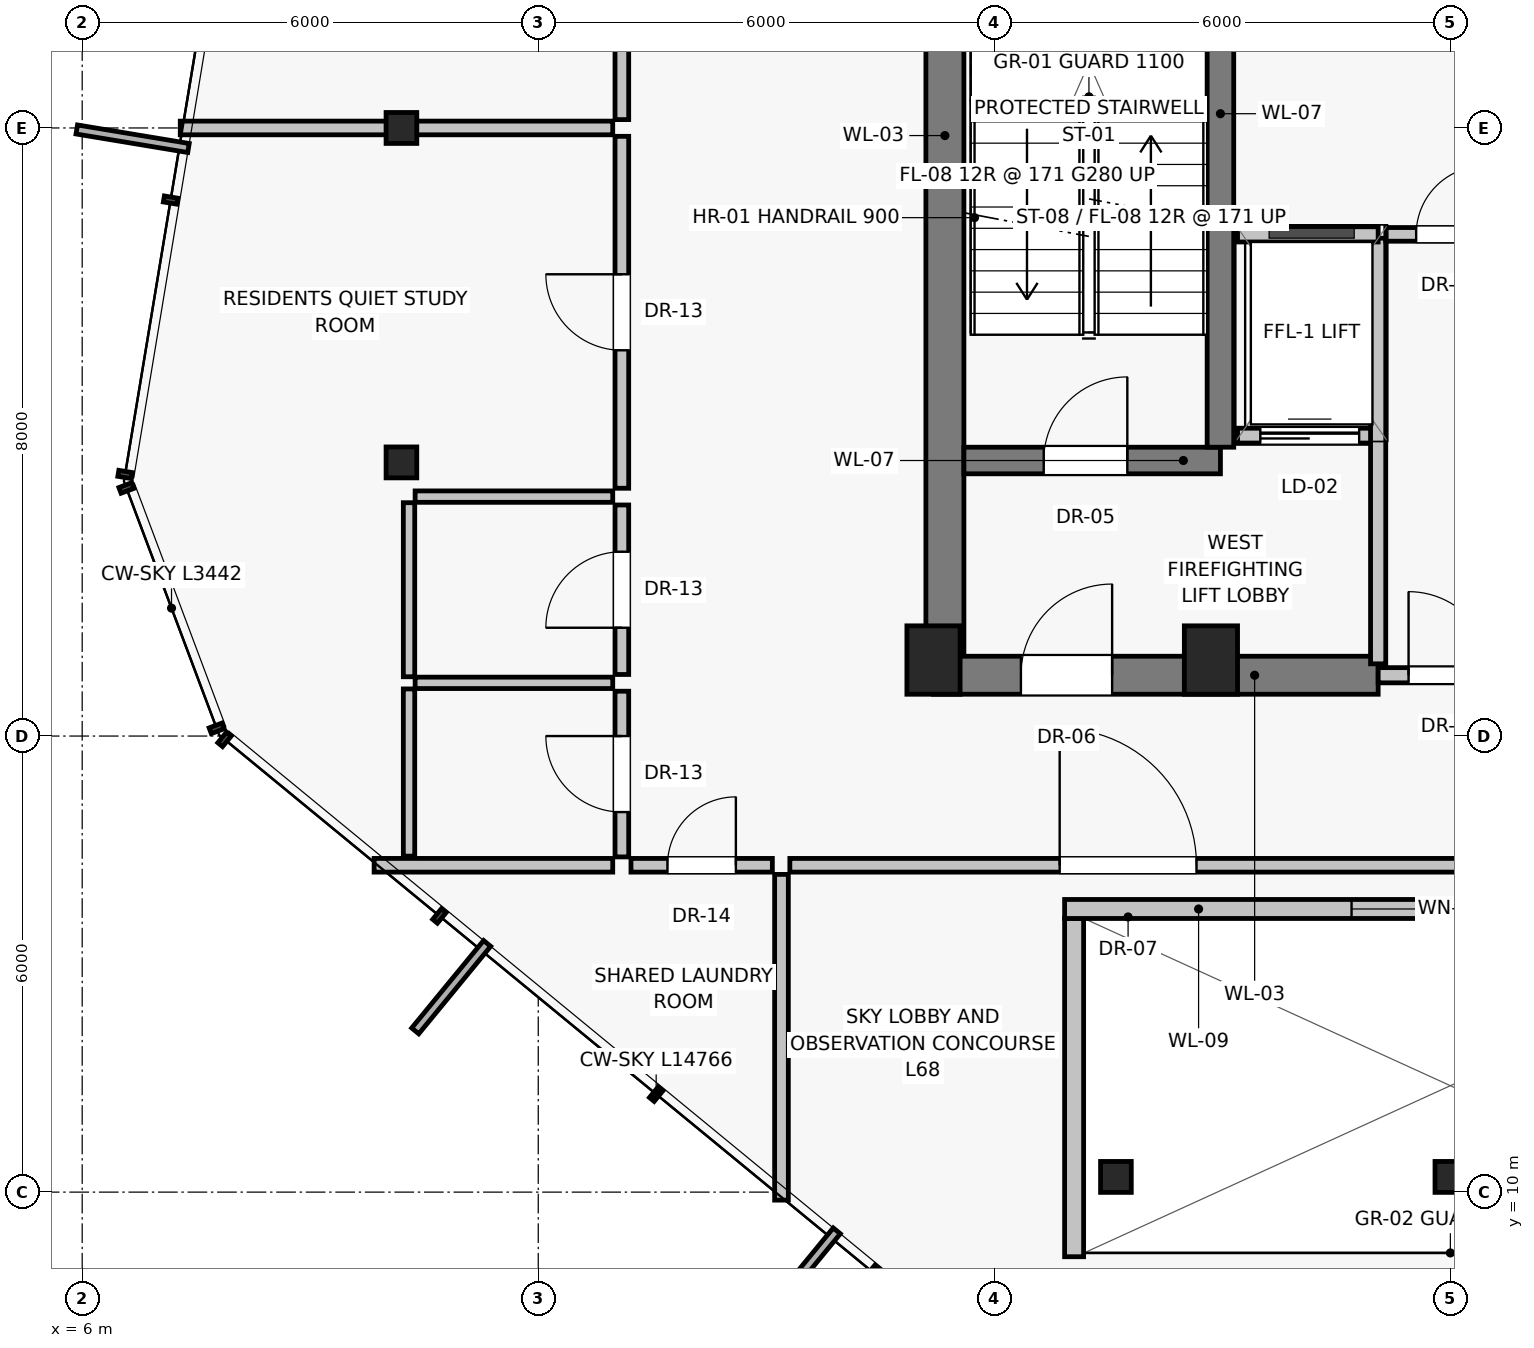
"""IFC4 building model, lengths in metres.
Left out: names, types, materials, properties, quantities, classifications, styles, units other than length and angle.
Written with IfcOpenShell. Run it as: python <this file> out.ifc"""

import sys

from ifc_helpers import new_model, si_unit, direction, frame, frame_2d, origin, origin_2d, place, context, subcontext, project, spatial, rectangle, i_section, extrude, source, transform, mapped, element, fill, save


model = new_model("IFC4")
c1 = context("Model", 3, precision=1e-05, world=origin(), true_north=direction((0.0, 1.0)))
c2 = subcontext(c1, "Body", "Model", "MODEL_VIEW")
j1 = project(units=[si_unit("LENGTHUNIT", "METRE"), si_unit("PLANEANGLEUNIT", "RADIAN")], contexts=[c1])
p1 = place(None, origin())
s1 = spatial("IfcSite", under=j1, at=p1, CompositionType="ELEMENT")
p2 = place(p1, origin())
s2 = spatial("IfcBuilding", under=s1, at=p2, CompositionType="ELEMENT")
p3 = place(p2, frame((0.0, 0.0, 240.65)))
s3 = spatial("IfcBuildingStorey", under=s2, at=p3, CompositionType="ELEMENT", Elevation=240.65)
for number, where, z_axis, x_axis in (
    (1, (17.2, 17.0, 0.0), (0.0, 0.0, 1.0), (1.0, 0.0, 0.0)),
    (2, (20.85, 17.0, 0.0), (0.0, 0.0, 1.0), (1.0, 0.0, 0.0)),
):
    element("IfcColumn", number, at=place(p3, frame(where, z_axis=z_axis, x_axis=x_axis)), inside=s3, PredefinedType="PILASTER", context=c2, shape_type="SweptSolid", body=[
        extrude(rectangle(XDim=0.7, YDim=0.9, at=origin_2d()), origin(), (0.0, 0.0, 1.0), 4.1),
    ])
for number, where, z_axis, x_axis in (
    (3, (10.2, 24.0, 0.0), (0.0, 0.0, 1.0), (1.0, 0.0, 0.0)),
    (4, (10.2, 19.6, 0.0), (0.0, 0.0, 1.0), (1.0, 0.0, 0.0)),
    (5, (19.6, 10.2, 0.0), (0.0, 0.0, 1.0), (1.0, 0.0, 0.0)),
    (6, (24.0, 10.2, 0.0), (0.0, 0.0, 1.0), (1.0, 0.0, 0.0)),
):
    element("IfcColumn", number, at=place(p3, frame(where, z_axis=z_axis, x_axis=x_axis)), inside=s3, PredefinedType="COLUMN", context=c2, shape_type="SweptSolid", body=[
        extrude(i_section(OverallWidth=0.404, OverallDepth=0.407, WebThickness=0.025, FlangeThickness=0.04, at=origin_2d()), origin(), (0.0, 0.0, 1.0), 4.1),
    ])
p4 = place(p3, frame((19.05, 9.15, 0.0), z_axis=(0.0, 0.0, 1.0), x_axis=(0.0, 1.0, 0.0)))
e7 = element("IfcWall", 7, at=p4, inside=s3, PredefinedType="SOLIDWALL", context=c2, shape_type="SweptSolid", body=[
    extrude(rectangle(XDim=4.45, YDim=0.25, at=frame_2d((2.225, 0.0))), origin(), (0.0, 0.0, 1.0), 3.393),
])
p5 = place(p3, frame((18.925, 13.725, 0.0), z_axis=(0.0, 0.0, 1.0), x_axis=(1.0, 0.0, 0.0)))
e8 = element("IfcWall", 8, at=p5, inside=s3, PredefinedType="SOLIDWALL", context=c2, shape_type="SweptSolid", body=[
    extrude(rectangle(XDim=10.15, YDim=0.25, at=frame_2d((5.075, 0.0))), origin(), (0.0, 0.0, 1.0), 3.512),
])
p6 = place(p5, frame((3.775, 0.0, 0.7)))
e9 = element("IfcOpeningElement", 9, at=p6, cuts=e8, PredefinedType="OPENING", context=c2, shape_type="SweptSolid", body=[
    extrude(rectangle(XDim=2.6, YDim=2.1, at=frame_2d((1.3, 1.05))), frame((0.0, 0.135, 0.0), z_axis=(0.0, -1.0, 0.0), x_axis=(1.0, 0.0, 0.0)), (0.0, 0.0, 1.0), 0.27),
])
p7 = place(p3, frame((17.35, 16.8, 0.0), z_axis=(0.0, 0.0, 1.0), x_axis=(0.0, 1.0, 0.0)))
e10 = element("IfcWall", 10, at=p7, inside=s3, PredefinedType="SHEAR", context=c2, shape_type="SweptSolid", body=[
    extrude(rectangle(XDim=14.2, YDim=0.5, at=frame_2d((7.1, 0.0))), origin(), (0.0, 0.0, 1.0), 3.865),
])
p8 = place(p3, frame((17.2, 16.8, 0.0), z_axis=(0.0, 0.0, 1.0), x_axis=(1.0, 0.0, 0.0)))
e11 = element("IfcWall", 11, at=p8, inside=s3, PredefinedType="SHEAR", context=c2, shape_type="SweptSolid", body=[
    extrude(rectangle(XDim=5.85, YDim=0.5, at=frame_2d((2.925, 0.0))), origin(), (0.0, 0.0, 1.0), 3.865),
])
p9 = place(p8, frame((1.15, 0.0, 0.0)))
e12 = element("IfcOpeningElement", 12, at=p9, cuts=e11, PredefinedType="OPENING", context=c2, shape_type="SweptSolid", body=[
    extrude(rectangle(XDim=1.2, YDim=2.03, at=frame_2d((0.6, 1.015))), frame((0.0, 0.26, 0.0), z_axis=(0.0, -1.0, 0.0), x_axis=(1.0, 0.0, 0.0)), (0.0, 0.0, 1.0), 0.52),
])
p10 = place(p3, frame((23.05, 16.8, 0.0), z_axis=(0.0, 0.0, 1.0), x_axis=(1.0, 0.0, 0.0)))
e13 = element("IfcWall", 13, at=p10, inside=s3, PredefinedType="SOLIDWALL", context=c2, shape_type="SweptSolid", body=[
    extrude(rectangle(XDim=1.9, YDim=0.2, at=frame_2d((0.95, 0.0))), origin(), (0.0, 0.0, 1.0), 3.015),
])
p11 = place(p10, frame((0.4, 0.0, 0.0)))
e14 = element("IfcOpeningElement", 14, at=p11, cuts=e13, PredefinedType="OPENING", context=c2, shape_type="SweptSolid", body=[
    extrude(rectangle(XDim=1.1, YDim=2.03, at=frame_2d((0.55, 1.015))), frame((0.0, 0.11, 0.0), z_axis=(0.0, -1.0, 0.0), x_axis=(1.0, 0.0, 0.0)), (0.0, 0.0, 1.0), 0.22),
])
p12 = place(p3, frame((17.6, 19.625, 0.0), z_axis=(0.0, 0.0, 1.0), x_axis=(1.0, 0.0, 0.0)))
e15 = element("IfcWall", 15, at=p12, inside=s3, PredefinedType="SHEAR", context=c2, shape_type="SweptSolid", body=[
    extrude(rectangle(XDim=3.375, YDim=0.35, at=frame_2d((1.688, 0.0))), origin(), (0.0, 0.0, 1.0), 3.865),
])
p13 = place(p12, frame((1.05, 0.0, 0.0)))
e16 = element("IfcOpeningElement", 16, at=p13, cuts=e15, PredefinedType="OPENING", context=c2, shape_type="SweptSolid", body=[
    extrude(rectangle(XDim=1.1, YDim=2.03, at=frame_2d((0.55, 1.015))), frame((0.0, 0.185, 0.0), z_axis=(0.0, -1.0, 0.0), x_axis=(1.0, 0.0, 0.0)), (0.0, 0.0, 1.0), 0.37),
])
p14 = place(p3, frame((21.2, 19.95, 0.0), z_axis=(0.0, 0.0, 1.0), x_axis=(1.0, 0.0, 0.0)))
e17 = element("IfcWall", 17, at=p14, inside=s3, PredefinedType="SOLIDWALL", context=c2, shape_type="SweptSolid", body=[
    extrude(rectangle(XDim=1.85, YDim=0.2, at=frame_2d((0.925, 0.0))), origin(), (0.0, 0.0, 1.0), 3.865),
])
p15 = place(p14, frame((0.3, 0.0, 0.0)))
e18 = element("IfcOpeningElement", 18, at=p15, cuts=e17, PredefinedType="OPENING", context=c2, shape_type="SweptSolid", body=[
    extrude(rectangle(XDim=1.3, YDim=2.25, at=frame_2d((0.65, 1.125))), frame((0.0, 0.11, 0.0), z_axis=(0.0, -1.0, 0.0), x_axis=(1.0, 0.0, 0.0)), (0.0, 0.0, 1.0), 0.22),
])
p16 = place(p3, frame((20.975, 19.8, 0.0), z_axis=(0.0, 0.0, 1.0), x_axis=(0.0, 1.0, 0.0)))
e19 = element("IfcWall", 19, at=p16, inside=s3, PredefinedType="SHEAR", context=c2, shape_type="SweptSolid", body=[
    extrude(rectangle(XDim=8.775, YDim=0.35, at=frame_2d((4.387, 0.0))), origin(), (0.0, 0.0, 1.0), 3.865),
])
p17 = place(p3, frame((23.05, 16.95, 0.0), z_axis=(0.0, 0.0, 1.0), x_axis=(0.0, 1.0, 0.0)))
e20 = element("IfcWall", 20, at=p17, inside=s3, PredefinedType="SOLIDWALL", context=c2, shape_type="SweptSolid", body=[
    extrude(rectangle(XDim=5.6, YDim=0.2, at=frame_2d((2.8, 0.0))), origin(), (0.0, 0.0, 1.0), 3.865),
])
p18 = place(p3, frame((21.2, 22.6, 0.0), z_axis=(0.0, 0.0, 1.0), x_axis=(1.0, 0.0, 0.0)))
e21 = element("IfcWall", 21, at=p18, inside=s3, PredefinedType="SOLIDWALL", context=c2, shape_type="SweptSolid", body=[
    extrude(rectangle(XDim=1.85, YDim=0.2, at=frame_2d((0.925, 0.0))), origin(), (0.0, 0.0, 1.0), 3.865),
])
p19 = place(p3, frame((23.15, 22.6, 0.0), z_axis=(0.0, 0.0, 1.0), x_axis=(1.0, 0.0, 0.0)))
e22 = element("IfcWall", 22, at=p19, inside=s3, PredefinedType="PARTITIONING", context=c2, shape_type="SweptSolid", body=[
    extrude(rectangle(XDim=1.7, YDim=0.18, at=frame_2d((0.85, 0.0))), origin(), (0.0, 0.0, 1.0), 3.865),
])
p20 = place(p19, frame((0.4, 0.0, 0.0)))
e23 = element("IfcOpeningElement", 23, at=p20, cuts=e22, PredefinedType="OPENING", context=c2, shape_type="SweptSolid", body=[
    extrude(rectangle(XDim=0.9, YDim=2.01, at=frame_2d((0.45, 1.005))), frame((0.0, 0.1, 0.0), z_axis=(0.0, -1.0, 0.0), x_axis=(1.0, 0.0, 0.0)), (0.0, 0.0, 1.0), 0.2),
])
p21 = place(p3, frame((15.2, 14.18, 0.0), z_axis=(0.0, 0.0, 1.0), x_axis=(0.0, -1.0, 0.0)))
e24 = element("IfcWall", 24, at=p21, inside=s3, PredefinedType="PARTITIONING", context=c2, shape_type="SweptSolid", body=[
    extrude(rectangle(XDim=4.285, YDim=0.18, at=frame_2d((2.143, 0.0))), origin(), (0.0, 0.0, 1.0), 3.865),
])
p22 = place(p3, frame((15.31, 14.3, 0.0), z_axis=(0.0, 0.0, 1.0), x_axis=(1.0, 0.0, 0.0)))
e25 = element("IfcWall", 25, at=p22, inside=s3, PredefinedType="PARTITIONING", context=c2, shape_type="SweptSolid", body=[
    extrude(rectangle(XDim=8.9, YDim=0.18, at=frame_2d((4.45, 0.0))), origin(), (0.0, 0.0, 1.0), 3.865),
])
p23 = place(p22, frame((3.55, 0.0, 0.0)))
e26 = element("IfcOpeningElement", 26, at=p23, cuts=e25, PredefinedType="OPENING", context=c2, shape_type="SweptSolid", body=[
    extrude(rectangle(XDim=1.8, YDim=2.25, at=frame_2d((0.9, 1.125))), frame((0.0, 0.1, 0.0), z_axis=(0.0, -1.0, 0.0), x_axis=(1.0, 0.0, 0.0)), (0.0, 0.0, 1.0), 0.2),
])
p24 = place(p3, frame((12.98, 14.3, 0.0), z_axis=(0.0, 0.0, 1.0), x_axis=(-1.0, 0.0, 0.0)))
e27 = element("IfcWall", 27, at=p24, inside=s3, PredefinedType="PARTITIONING", context=c2, shape_type="SweptSolid", body=[
    extrude(rectangle(XDim=3.139, YDim=0.18, at=frame_2d((1.57, 0.0))), origin(), (0.0, 0.0, 1.0), 3.865),
])
p25 = place(p3, frame((13.1, 14.41, 0.0), z_axis=(0.0, 0.0, 1.0), x_axis=(0.0, 1.0, 0.0)))
e28 = element("IfcWall", 28, at=p25, inside=s3, PredefinedType="PARTITIONING", context=c2, shape_type="SweptSolid", body=[
    extrude(rectangle(XDim=2.18, YDim=0.18, at=frame_2d((1.09, 0.0))), origin(), (0.0, 0.0, 1.0), 3.865),
])
p26 = place(p25, frame((0.59, 0.0, 0.0)))
e29 = element("IfcOpeningElement", 29, at=p26, cuts=e28, PredefinedType="OPENING", context=c2, shape_type="SweptSolid", body=[
    extrude(rectangle(XDim=1.0, YDim=2.01, at=frame_2d((0.5, 1.005))), frame((0.0, 0.1, 0.0), z_axis=(0.0, -1.0, 0.0), x_axis=(1.0, 0.0, 0.0)), (0.0, 0.0, 1.0), 0.2),
])
p27 = place(p3, frame((13.1, 16.81, 0.0), z_axis=(0.0, 0.0, 1.0), x_axis=(0.0, 1.0, 0.0)))
e30 = element("IfcWall", 30, at=p27, inside=s3, PredefinedType="PARTITIONING", context=c2, shape_type="SweptSolid", body=[
    extrude(rectangle(XDim=2.23, YDim=0.18, at=frame_2d((1.115, 0.0))), origin(), (0.0, 0.0, 1.0), 3.512),
])
p28 = place(p27, frame((0.615, 0.0, 0.0)))
e31 = element("IfcOpeningElement", 31, at=p28, cuts=e30, PredefinedType="OPENING", context=c2, shape_type="SweptSolid", body=[
    extrude(rectangle(XDim=1.0, YDim=2.01, at=frame_2d((0.5, 1.005))), frame((0.0, 0.1, 0.0), z_axis=(0.0, -1.0, 0.0), x_axis=(1.0, 0.0, 0.0)), (0.0, 0.0, 1.0), 0.2),
])
p29 = place(p3, frame((13.1, 19.26, 0.0), z_axis=(0.0, 0.0, 1.0), x_axis=(0.0, 1.0, 0.0)))
e32 = element("IfcWall", 32, at=p29, inside=s3, PredefinedType="PARTITIONING", context=c2, shape_type="SweptSolid", body=[
    extrude(rectangle(XDim=4.63, YDim=0.18, at=frame_2d((2.315, 0.0))), origin(), (0.0, 0.0, 1.0), 3.512),
])
p30 = place(p29, frame((1.815, 0.0, 0.0)))
e33 = element("IfcOpeningElement", 33, at=p30, cuts=e32, PredefinedType="OPENING", context=c2, shape_type="SweptSolid", body=[
    extrude(rectangle(XDim=1.0, YDim=2.01, at=frame_2d((0.5, 1.005))), frame((0.0, 0.1, 0.0), z_axis=(0.0, -1.0, 0.0), x_axis=(1.0, 0.0, 0.0)), (0.0, 0.0, 1.0), 0.2),
])
p31 = place(p3, frame((13.1, 24.11, 0.0), z_axis=(0.0, 0.0, 1.0), x_axis=(0.0, 1.0, 0.0)))
e34 = element("IfcWall", 34, at=p31, inside=s3, PredefinedType="PARTITIONING", context=c2, shape_type="SweptSolid", body=[
    extrude(rectangle(XDim=9.28, YDim=0.18, at=frame_2d((4.64, 0.0))), origin(), (0.0, 0.0, 1.0), 3.512),
])
p32 = place(p31, frame((4.14, 0.0, 0.0)))
e35 = element("IfcOpeningElement", 35, at=p32, cuts=e34, PredefinedType="OPENING", context=c2, shape_type="SweptSolid", body=[
    extrude(rectangle(XDim=1.0, YDim=2.01, at=frame_2d((0.5, 1.005))), frame((0.0, 0.1, 0.0), z_axis=(0.0, -1.0, 0.0), x_axis=(1.0, 0.0, 0.0)), (0.0, 0.0, 1.0), 0.2),
])
for number, where, z_axis, x_axis in (
    (36, (12.98, 16.7, 0.0), (0.0, 0.0, 1.0), (-1.0, 0.0, 0.0)),
    (37, (12.98, 19.15, 0.0), (0.0, 0.0, 1.0), (-1.0, 0.0, 0.0)),
):
    element("IfcWall", number, at=place(p3, frame(where, z_axis=z_axis, x_axis=x_axis)), inside=s3, PredefinedType="PARTITIONING", context=c2, shape_type="SweptSolid", body=[
        extrude(rectangle(XDim=2.6, YDim=0.15, at=frame_2d((1.3, 0.0))), origin(), (0.0, 0.0, 1.0), 3.865),
    ])
p33 = place(p3, frame((10.3, 14.42, 0.0), z_axis=(0.0, 0.0, 1.0), x_axis=(0.0, 1.0, 0.0)))
e38 = element("IfcWall", 38, at=p33, inside=s3, PredefinedType="PARTITIONING", context=c2, shape_type="SweptSolid", body=[
    extrude(rectangle(XDim=2.2, YDim=0.15, at=frame_2d((1.1, 0.0))), origin(), (0.0, 0.0, 1.0), 3.865),
])
p34 = place(p3, frame((10.3, 16.78, 0.0), z_axis=(0.0, 0.0, 1.0), x_axis=(0.0, 1.0, 0.0)))
e39 = element("IfcWall", 39, at=p34, inside=s3, PredefinedType="PARTITIONING", context=c2, shape_type="SweptSolid", body=[
    extrude(rectangle(XDim=2.29, YDim=0.15, at=frame_2d((1.145, 0.0))), origin(), (0.0, 0.0, 1.0), 3.865),
])
p35 = place(p3, frame((12.98, 24.0, 0.0), z_axis=(0.0, 0.0, 1.0), x_axis=(-1.0, 0.0, 0.0)))
e40 = element("IfcWall", 40, at=p35, inside=s3, PredefinedType="PARTITIONING", context=c2, shape_type="SweptSolid", body=[
    extrude(rectangle(XDim=5.69, YDim=0.18, at=frame_2d((2.845, 0.0))), origin(), (0.0, 0.0, 1.0), 3.865),
])
p36 = place(p3, frame((13.22, 14.3, 0.0), z_axis=(0.0, 0.0, 1.0), x_axis=(1.0, 0.0, 0.0)))
e41 = element("IfcWall", 41, at=p36, inside=s3, PredefinedType="PARTITIONING", context=c2, shape_type="SweptSolid", body=[
    extrude(rectangle(XDim=1.86, YDim=0.18, at=frame_2d((0.93, 0.0))), origin(), (0.0, 0.0, 1.0), 3.865),
])
p37 = place(p36, frame((0.48, 0.0, 0.0)))
e42 = element("IfcOpeningElement", 42, at=p37, cuts=e41, PredefinedType="OPENING", context=c2, shape_type="SweptSolid", body=[
    extrude(rectangle(XDim=0.9, YDim=2.01, at=frame_2d((0.45, 1.005))), frame((0.0, 0.1, 0.0), z_axis=(0.0, -1.0, 0.0), x_axis=(1.0, 0.0, 0.0)), (0.0, 0.0, 1.0), 0.2),
])
m1 = source(origin(), c2, "Body", "SweptSolid", [
    extrude(rectangle(XDim=2.6, YDim=2.1, at=frame_2d((1.3, 1.05))), frame((0.0, 0.03, 0.0), z_axis=(0.0, -1.0, 0.0), x_axis=(1.0, 0.0, 0.0)), (0.0, 0.0, 1.0), 0.06),
])
p38 = place(p6, origin())
e43 = element("IfcWindow", 43, at=p38, inside=s3, PartitioningType="SINGLE_PANEL", PredefinedType="WINDOW", context=c2, shape_type="MappedRepresentation", body=[
    mapped(m1, transform((0.0, 0.0, 0.0), scale=1.0)),
])
fill(e9, e43)
m2 = source(origin(), c2, "Body", "SweptSolid", [
    extrude(rectangle(XDim=1.2, YDim=2.03, at=frame_2d((0.6, 1.015))), frame((0.0, 0.025, 0.0), z_axis=(0.0, -1.0, 0.0), x_axis=(1.0, 0.0, 0.0)), (0.0, 0.0, 1.0), 0.05),
])
p39 = place(p9, origin())
e44 = element("IfcDoor", 44, at=p39, inside=s3, OperationType="SINGLE_SWING_RIGHT", PredefinedType="DOOR", context=c2, shape_type="MappedRepresentation", body=[
    mapped(m2, transform((0.0, 0.0, 0.0), scale=1.0)),
])
fill(e12, e44)
m3 = source(origin(), c2, "Body", "SweptSolid", [
    extrude(rectangle(XDim=1.1, YDim=2.03, at=frame_2d((0.55, 1.015))), frame((0.0, 0.025, 0.0), z_axis=(0.0, -1.0, 0.0), x_axis=(1.0, 0.0, 0.0)), (0.0, 0.0, 1.0), 0.05),
])
p40 = place(p11, origin())
e45 = element("IfcDoor", 45, at=p40, inside=s3, OperationType="SINGLE_SWING_LEFT", PredefinedType="DOOR", context=c2, shape_type="MappedRepresentation", body=[
    mapped(m3, transform((0.0, 0.0, 0.0), scale=1.0)),
])
fill(e14, e45)
p41 = place(p13, origin())
e46 = element("IfcDoor", 46, at=p41, inside=s3, OperationType="SINGLE_SWING_RIGHT", PredefinedType="DOOR", context=c2, shape_type="MappedRepresentation", body=[
    mapped(m3, transform((0.0, 0.0, 0.0), scale=1.0)),
])
fill(e16, e46)
m4 = source(origin(), c2, "Body", "SweptSolid", [
    extrude(rectangle(XDim=1.3, YDim=2.25, at=frame_2d((0.65, 1.125))), frame((0.0, 0.025, 0.0), z_axis=(0.0, -1.0, 0.0), x_axis=(1.0, 0.0, 0.0)), (0.0, 0.0, 1.0), 0.05),
])
p42 = place(p15, origin())
e47 = element("IfcDoor", 47, at=p42, inside=s3, OperationType="SLIDING_TO_LEFT", PredefinedType="DOOR", context=c2, shape_type="MappedRepresentation", body=[
    mapped(m4, transform((0.0, 0.0, 0.0), scale=1.0)),
])
fill(e18, e47)
m5 = source(origin(), c2, "Body", "SweptSolid", [
    extrude(rectangle(XDim=0.9, YDim=2.01, at=frame_2d((0.45, 1.005))), frame((0.0, 0.025, 0.0), z_axis=(0.0, -1.0, 0.0), x_axis=(1.0, 0.0, 0.0)), (0.0, 0.0, 1.0), 0.05),
])
p43 = place(p20, origin())
e48 = element("IfcDoor", 48, at=p43, inside=s3, OperationType="SINGLE_SWING_RIGHT", PredefinedType="DOOR", context=c2, shape_type="MappedRepresentation", body=[
    mapped(m5, transform((0.0, 0.0, 0.0), scale=1.0)),
])
fill(e23, e48)
m6 = source(origin(), c2, "Body", "SweptSolid", [
    extrude(rectangle(XDim=1.8, YDim=2.25, at=frame_2d((0.9, 1.125))), frame((0.0, 0.025, 0.0), z_axis=(0.0, -1.0, 0.0), x_axis=(1.0, 0.0, 0.0)), (0.0, 0.0, 1.0), 0.05),
])
p44 = place(p23, origin())
e49 = element("IfcDoor", 49, at=p44, inside=s3, OperationType="SINGLE_SWING_LEFT", PredefinedType="DOOR", context=c2, shape_type="MappedRepresentation", body=[
    mapped(m6, transform((0.0, 0.0, 0.0), scale=1.0)),
])
fill(e26, e49)
m7 = source(origin(), c2, "Body", "SweptSolid", [
    extrude(rectangle(XDim=1.0, YDim=2.01, at=frame_2d((0.5, 1.005))), frame((0.0, 0.025, 0.0), z_axis=(0.0, -1.0, 0.0), x_axis=(1.0, 0.0, 0.0)), (0.0, 0.0, 1.0), 0.05),
])
p45 = place(p26, origin())
e50 = element("IfcDoor", 50, at=p45, inside=s3, OperationType="SINGLE_SWING_RIGHT", PredefinedType="DOOR", context=c2, shape_type="MappedRepresentation", body=[
    mapped(m7, transform((0.0, 0.0, 0.0), scale=1.0)),
])
fill(e29, e50)
p46 = place(p28, origin())
e51 = element("IfcDoor", 51, at=p46, inside=s3, OperationType="SINGLE_SWING_LEFT", PredefinedType="DOOR", context=c2, shape_type="MappedRepresentation", body=[
    mapped(m7, transform((0.0, 0.0, 0.0), scale=1.0)),
])
fill(e31, e51)
p47 = place(p30, origin())
e52 = element("IfcDoor", 52, at=p47, inside=s3, OperationType="SINGLE_SWING_RIGHT", PredefinedType="DOOR", context=c2, shape_type="MappedRepresentation", body=[
    mapped(m7, transform((0.0, 0.0, 0.0), scale=1.0)),
])
fill(e33, e52)
p48 = place(p37, origin())
e53 = element("IfcDoor", 53, at=p48, inside=s3, OperationType="SINGLE_SWING_RIGHT", PredefinedType="DOOR", context=c2, shape_type="MappedRepresentation", body=[
    mapped(m5, transform((0.0, 0.0, 0.0), scale=1.0)),
])
fill(e42, e53)
save(model, sys.argv[1])
